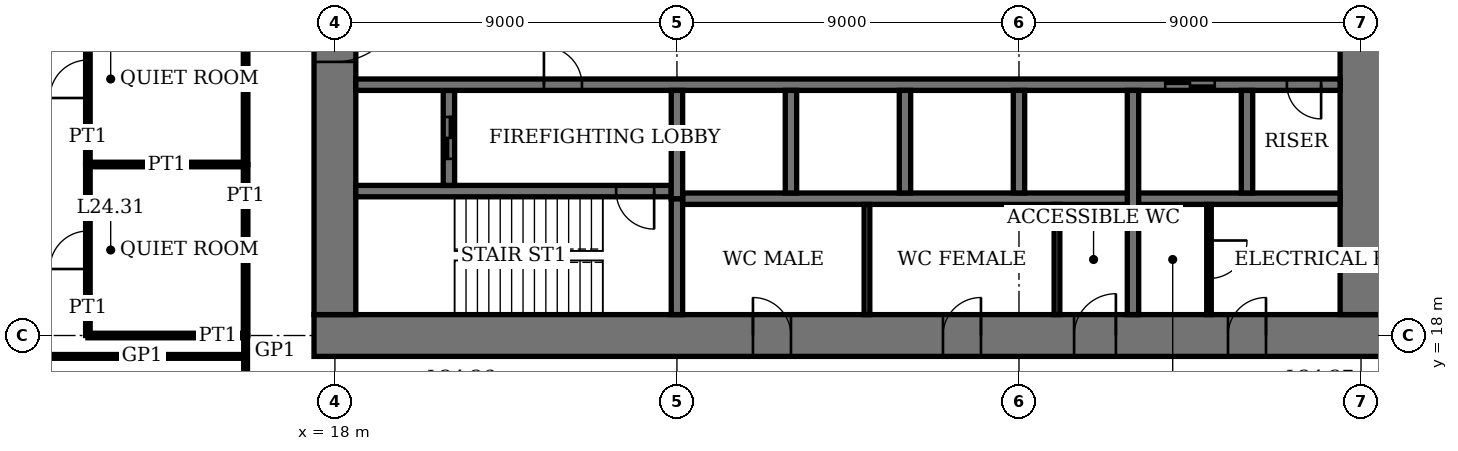
"""IFC4 building model, lengths in metres.
Left out: names, types, materials, properties, quantities, classifications, styles, units other than length and angle.
Written with IfcOpenShell. Run it as: python <this file> out.ifc"""

import sys

from ifc_helpers import new_model, si_unit, direction, frame, frame_2d, origin, place, context, subcontext, project, spatial, rectangle, extrude, element, fill, save


model = new_model("IFC4")
c1 = context("Model", 3, precision=1e-05, world=origin(), true_north=direction((0.0, 1.0)))
c2 = subcontext(c1, "Body", "Model", "MODEL_VIEW")
j1 = project(units=[si_unit("LENGTHUNIT", "METRE"), si_unit("PLANEANGLEUNIT", "RADIAN")], contexts=[c1])
p1 = place(None, origin())
s1 = spatial("IfcSite", under=j1, at=p1, CompositionType="ELEMENT")
p2 = place(p1, origin())
s2 = spatial("IfcBuilding", under=s1, at=p2, CompositionType="ELEMENT")
p3 = place(p2, frame((0.0, 0.0, 101.0)))
s3 = spatial("IfcBuildingStorey", under=s2, at=p3, CompositionType="ELEMENT", Elevation=101.0)
p4 = place(p3, frame((17.45, 18.0, 0.0), z_axis=(0.0, 0.0, 1.0), x_axis=(1.0, 0.0, 0.0)))
e1 = element("IfcWall", 1, at=p4, inside=s3, PredefinedType="SHEAR", context=c2, shape_type="SweptSolid", body=[
    extrude(rectangle(XDim=28.1, YDim=1.1, at=frame_2d((14.05, 0.0))), origin(), (0.0, 0.0, 1.0), 4.0),
])
p5 = place(p4, frame((11.55, 0.0, 0.0)))
e2 = element("IfcOpeningElement", 2, at=p5, cuts=e1, PredefinedType="OPENING", context=c2, shape_type="SweptSolid", body=[
    extrude(rectangle(XDim=1.0, YDim=2.4, at=frame_2d((0.5, 1.2))), frame((0.0, 0.56, 0.0), z_axis=(0.0, -1.0, 0.0), x_axis=(1.0, 0.0, 0.0)), (0.0, 0.0, 1.0), 1.12),
])
p6 = place(p4, frame((16.55, 0.0, 0.0)))
e3 = element("IfcOpeningElement", 3, at=p6, cuts=e1, PredefinedType="OPENING", context=c2, shape_type="SweptSolid", body=[
    extrude(rectangle(XDim=1.0, YDim=2.4, at=frame_2d((0.5, 1.2))), frame((0.0, 0.56, 0.0), z_axis=(0.0, -1.0, 0.0), x_axis=(1.0, 0.0, 0.0)), (0.0, 0.0, 1.0), 1.12),
])
p7 = place(p4, frame((20.0, 0.0, 0.0)))
e4 = element("IfcOpeningElement", 4, at=p7, cuts=e1, PredefinedType="OPENING", context=c2, shape_type="SweptSolid", body=[
    extrude(rectangle(XDim=1.1, YDim=2.4, at=frame_2d((0.55, 1.2))), frame((0.0, 0.56, 0.0), z_axis=(0.0, -1.0, 0.0), x_axis=(1.0, 0.0, 0.0)), (0.0, 0.0, 1.0), 1.12),
])
p8 = place(p4, frame((24.05, 0.0, 0.0)))
e5 = element("IfcOpeningElement", 5, at=p8, cuts=e1, PredefinedType="OPENING", context=c2, shape_type="SweptSolid", body=[
    extrude(rectangle(XDim=1.0, YDim=2.4, at=frame_2d((0.5, 1.2))), frame((0.0, 0.56, 0.0), z_axis=(0.0, -1.0, 0.0), x_axis=(1.0, 0.0, 0.0)), (0.0, 0.0, 1.0), 1.12),
])
p9 = place(p3, frame((18.0, 35.45, 0.0), z_axis=(0.0, 0.0, 1.0), x_axis=(0.0, -1.0, 0.0)))
e6 = element("IfcWall", 6, at=p9, inside=s3, PredefinedType="SHEAR", context=c2, shape_type="SweptSolid", body=[
    extrude(rectangle(XDim=16.9, YDim=1.1, at=frame_2d((8.45, 0.0))), origin(), (0.0, 0.0, 1.0), 4.0),
])
p10 = place(p9, frame((8.45, 0.0, 0.0)))
e7 = element("IfcOpeningElement", 7, at=p10, cuts=e6, PredefinedType="OPENING", context=c2, shape_type="SweptSolid", body=[
    extrude(rectangle(XDim=1.8, YDim=2.4, at=frame_2d((0.9, 1.2))), frame((0.0, 0.56, 0.0), z_axis=(0.0, -1.0, 0.0), x_axis=(1.0, 0.0, 0.0)), (0.0, 0.0, 1.0), 1.12),
])
p11 = place(p3, frame((45.0, 18.55, 0.0), z_axis=(0.0, 0.0, 1.0), x_axis=(0.0, 1.0, 0.0)))
e8 = element("IfcWall", 8, at=p11, inside=s3, PredefinedType="SHEAR", context=c2, shape_type="SweptSolid", body=[
    extrude(rectangle(XDim=16.9, YDim=1.1, at=frame_2d((8.45, 0.0))), origin(), (0.0, 0.0, 1.0), 4.0),
])
p12 = place(p11, frame((8.45, 0.0, 0.0)))
e9 = element("IfcOpeningElement", 9, at=p12, cuts=e8, PredefinedType="OPENING", context=c2, shape_type="SweptSolid", body=[
    extrude(rectangle(XDim=1.8, YDim=2.4, at=frame_2d((0.9, 1.2))), frame((0.0, 0.56, 0.0), z_axis=(0.0, -1.0, 0.0), x_axis=(1.0, 0.0, 0.0)), (0.0, 0.0, 1.0), 1.12),
])
p13 = place(p3, frame((18.55, 21.8, 0.0), z_axis=(0.0, 0.0, 1.0), x_axis=(1.0, 0.0, 0.0)))
e10 = element("IfcWall", 10, at=p13, inside=s3, PredefinedType="SHEAR", context=c2, shape_type="SweptSolid", body=[
    extrude(rectangle(XDim=8.3, YDim=0.3, at=frame_2d((4.15, 0.0))), origin(), (0.0, 0.0, 1.0), 4.0),
])
p14 = place(p13, frame((6.85, 0.0, 0.0)))
e11 = element("IfcOpeningElement", 11, at=p14, cuts=e10, PredefinedType="OPENING", context=c2, shape_type="SweptSolid", body=[
    extrude(rectangle(XDim=1.0, YDim=2.4, at=frame_2d((0.5, 1.2))), frame((0.0, 0.16, 0.0), z_axis=(0.0, -1.0, 0.0), x_axis=(1.0, 0.0, 0.0)), (0.0, 0.0, 1.0), 0.32),
])
p15 = place(p3, frame((27.0, 18.55, 0.0), z_axis=(0.0, 0.0, 1.0), x_axis=(0.0, 1.0, 0.0)))
e12 = element("IfcWall", 12, at=p15, inside=s3, PredefinedType="SHEAR", context=c2, shape_type="SweptSolid", body=[
    extrude(rectangle(XDim=3.05, YDim=0.3, at=frame_2d((1.525, 0.0))), origin(), (0.0, 0.0, 1.0), 4.0),
])
p16 = place(p3, frame((21.0, 21.95, 0.0), z_axis=(0.0, 0.0, 1.0), x_axis=(0.0, 1.0, 0.0)))
e13 = element("IfcWall", 13, at=p16, inside=s3, PredefinedType="SHEAR", context=c2, shape_type="SweptSolid", body=[
    extrude(rectangle(XDim=2.5, YDim=0.3, at=frame_2d((1.25, 0.0))), origin(), (0.0, 0.0, 1.0), 4.0),
])
p17 = place(p16, frame((0.7, 0.0, 0.0)))
e14 = element("IfcOpeningElement", 14, at=p17, cuts=e13, PredefinedType="OPENING", context=c2, shape_type="SweptSolid", body=[
    extrude(rectangle(XDim=1.1, YDim=2.4, at=frame_2d((0.55, 1.2))), frame((0.0, 0.16, 0.0), z_axis=(0.0, -1.0, 0.0), x_axis=(1.0, 0.0, 0.0)), (0.0, 0.0, 1.0), 0.32),
])
p18 = place(p3, frame((18.55, 24.6, 0.0), z_axis=(0.0, 0.0, 1.0), x_axis=(1.0, 0.0, 0.0)))
e15 = element("IfcWall", 15, at=p18, inside=s3, PredefinedType="SHEAR", context=c2, shape_type="SweptSolid", body=[
    extrude(rectangle(XDim=25.9, YDim=0.3, at=frame_2d((12.95, 0.0))), origin(), (0.0, 0.0, 1.0), 4.0),
])
p19 = place(p18, frame((4.95, 0.0, 0.0)))
e16 = element("IfcOpeningElement", 16, at=p19, cuts=e15, PredefinedType="OPENING", context=c2, shape_type="SweptSolid", body=[
    extrude(rectangle(XDim=1.0, YDim=2.4, at=frame_2d((0.5, 1.2))), frame((0.0, 0.16, 0.0), z_axis=(0.0, -1.0, 0.0), x_axis=(1.0, 0.0, 0.0)), (0.0, 0.0, 1.0), 0.32),
])
p20 = place(p18, frame((24.5, 0.0, 0.0)))
e17 = element("IfcOpeningElement", 17, at=p20, cuts=e15, PredefinedType="OPENING", context=c2, shape_type="SweptSolid", body=[
    extrude(rectangle(XDim=0.9, YDim=2.1, at=frame_2d((0.45, 1.05))), frame((0.0, 0.16, 0.0), z_axis=(0.0, -1.0, 0.0), x_axis=(1.0, 0.0, 0.0)), (0.0, 0.0, 1.0), 0.32),
])
p21 = place(p18, frame((21.3, 0.0, 0.0)))
e18 = element("IfcOpeningElement", 18, at=p21, cuts=e15, PredefinedType="OPENING", context=c2, shape_type="SweptSolid", body=[
    extrude(rectangle(XDim=1.3, YDim=2.4, at=frame_2d((0.65, 1.2))), frame((0.0, 0.16, 0.0), z_axis=(0.0, -1.0, 0.0), x_axis=(1.0, 0.0, 0.0)), (0.0, 0.0, 1.0), 0.32),
])
p22 = place(p3, frame((27.15, 21.6, 0.0), z_axis=(0.0, 0.0, 1.0), x_axis=(1.0, 0.0, 0.0)))
e19 = element("IfcWall", 19, at=p22, inside=s3, PredefinedType="SHEAR", context=c2, shape_type="SweptSolid", body=[
    extrude(rectangle(XDim=17.3, YDim=0.3, at=frame_2d((8.65, 0.0))), origin(), (0.0, 0.0, 1.0), 4.0),
])
for number, where, z_axis, x_axis in (
    (20, (30.0, 21.75, 0.0), (0.0, 0.0, 1.0), (0.0, 1.0, 0.0)),
    (21, (33.0, 21.75, 0.0), (0.0, 0.0, 1.0), (0.0, 1.0, 0.0)),
    (22, (36.0, 21.75, 0.0), (0.0, 0.0, 1.0), (0.0, 1.0, 0.0)),
):
    element("IfcWall", number, at=place(p3, frame(where, z_axis=z_axis, x_axis=x_axis)), inside=s3, PredefinedType="SHEAR", context=c2, shape_type="SweptSolid", body=[
        extrude(rectangle(XDim=2.7, YDim=0.3, at=frame_2d((1.35, 0.0))), origin(), (0.0, 0.0, 1.0), 4.0),
    ])
p23 = place(p3, frame((39.0, 18.55, 0.0), z_axis=(0.0, 0.0, 1.0), x_axis=(0.0, 1.0, 0.0)))
e23 = element("IfcWall", 23, at=p23, inside=s3, PredefinedType="SHEAR", context=c2, shape_type="SweptSolid", body=[
    extrude(rectangle(XDim=5.9, YDim=0.3, at=frame_2d((2.95, 0.0))), origin(), (0.0, 0.0, 1.0), 4.0),
])
p24 = place(p3, frame((42.0, 21.75, 0.0), z_axis=(0.0, 0.0, 1.0), x_axis=(0.0, 1.0, 0.0)))
e24 = element("IfcWall", 24, at=p24, inside=s3, PredefinedType="SHEAR", context=c2, shape_type="SweptSolid", body=[
    extrude(rectangle(XDim=2.7, YDim=0.3, at=frame_2d((1.35, 0.0))), origin(), (0.0, 0.0, 1.0), 4.0),
])
p25 = place(p3, frame((27.0, 21.6, 0.0), z_axis=(0.0, 0.0, 1.0), x_axis=(0.0, 1.0, 0.0)))
e25 = element("IfcWall", 25, at=p25, inside=s3, PredefinedType="SHEAR", context=c2, shape_type="SweptSolid", body=[
    extrude(rectangle(XDim=2.85, YDim=0.3, at=frame_2d((1.425, 0.0))), origin(), (0.0, 0.0, 1.0), 4.0),
])
p26 = place(p3, frame((10.0, 17.45, 0.0), z_axis=(0.0, 0.0, 1.0), x_axis=(1.0, 0.0, 0.0)))
e26 = element("IfcWall", 26, at=p26, inside=s3, PredefinedType="PARTITIONING", context=c2, shape_type="SweptSolid", body=[
    extrude(rectangle(XDim=5.65, YDim=0.1, at=frame_2d((2.825, 0.0))), origin(), (0.0, 0.0, 1.0), 3.75),
])
p27 = place(p3, frame((11.5, 18.0, 0.0), z_axis=(0.0, 0.0, 1.0), x_axis=(1.0, 0.0, 0.0)))
e27 = element("IfcWall", 27, at=p27, inside=s3, PredefinedType="PARTITIONING", context=c2, shape_type="SweptSolid", body=[
    extrude(rectangle(XDim=4.15, YDim=0.12, at=frame_2d((2.075, 0.0))), origin(), (0.0, 0.0, 1.0), 3.05),
])
p28 = place(p3, frame((11.5, 22.5, 0.0), z_axis=(0.0, 0.0, 1.0), x_axis=(1.0, 0.0, 0.0)))
e28 = element("IfcWall", 28, at=p28, inside=s3, PredefinedType="PARTITIONING", context=c2, shape_type="SweptSolid", body=[
    extrude(rectangle(XDim=4.15, YDim=0.12, at=frame_2d((2.075, 0.0))), origin(), (0.0, 0.0, 1.0), 3.1),
])
p29 = place(p3, frame((11.5, 18.0, 0.0), z_axis=(0.0, 0.0, 1.0), x_axis=(0.0, 1.0, 0.0)))
e29 = element("IfcWall", 29, at=p29, inside=s3, PredefinedType="PARTITIONING", context=c2, shape_type="SweptSolid", body=[
    extrude(rectangle(XDim=4.5, YDim=0.12, at=frame_2d((2.25, 0.0))), origin(), (0.0, 0.0, 1.0), 3.75),
])
p30 = place(p29, frame((1.75, 0.0, 0.0)))
e30 = element("IfcOpeningElement", 30, at=p30, cuts=e29, PredefinedType="OPENING", context=c2, shape_type="SweptSolid", body=[
    extrude(rectangle(XDim=1.0, YDim=2.4, at=frame_2d((0.5, 1.2))), frame((0.0, 0.07, 0.0), z_axis=(0.0, -1.0, 0.0), x_axis=(1.0, 0.0, 0.0)), (0.0, 0.0, 1.0), 0.14),
])
p31 = place(p3, frame((11.5, 22.5, 0.0), z_axis=(0.0, 0.0, 1.0), x_axis=(0.0, 1.0, 0.0)))
e31 = element("IfcWall", 31, at=p31, inside=s3, PredefinedType="PARTITIONING", context=c2, shape_type="SweptSolid", body=[
    extrude(rectangle(XDim=4.5, YDim=0.12, at=frame_2d((2.25, 0.0))), origin(), (0.0, 0.0, 1.0), 3.75),
])
p32 = place(p31, frame((1.75, 0.0, 0.0)))
e32 = element("IfcOpeningElement", 32, at=p32, cuts=e31, PredefinedType="OPENING", context=c2, shape_type="SweptSolid", body=[
    extrude(rectangle(XDim=1.0, YDim=2.4, at=frame_2d((0.5, 1.2))), frame((0.0, 0.07, 0.0), z_axis=(0.0, -1.0, 0.0), x_axis=(1.0, 0.0, 0.0)), (0.0, 0.0, 1.0), 0.14),
])
for number, where, z_axis, x_axis in (
    (33, (15.65, 18.0, 0.0), (0.0, 0.0, 1.0), (0.0, 1.0, 0.0)),
    (34, (15.65, 22.5, 0.0), (0.0, 0.0, 1.0), (0.0, 1.0, 0.0)),
):
    element("IfcWall", number, at=place(p3, frame(where, z_axis=z_axis, x_axis=x_axis)), inside=s3, PredefinedType="PARTITIONING", context=c2, shape_type="SweptSolid", body=[
        extrude(rectangle(XDim=4.5, YDim=0.12, at=frame_2d((2.25, 0.0))), origin(), (0.0, 0.0, 1.0), 3.75),
    ])
p33 = place(p3, frame((15.65, 15.65, 0.0), z_axis=(0.0, 0.0, 1.0), x_axis=(0.0, 1.0, 0.0)))
e35 = element("IfcWall", 35, at=p33, inside=s3, PredefinedType="PARTITIONING", context=c2, shape_type="SweptSolid", body=[
    extrude(rectangle(XDim=2.35, YDim=0.1, at=frame_2d((1.175, 0.0))), origin(), (0.0, 0.0, 1.0), 3.75),
])
for number, where, z_axis, x_axis in (
    (36, (32.0, 18.55, 0.0), (0.0, 0.0, 1.0), (0.0, 1.0, 0.0)),
    (37, (37.0, 18.55, 0.0), (0.0, 0.0, 1.0), (0.0, 1.0, 0.0)),
):
    element("IfcWall", number, at=place(p3, frame(where, z_axis=z_axis, x_axis=x_axis)), inside=s3, PredefinedType="PARTITIONING", context=c2, shape_type="SweptSolid", body=[
        extrude(rectangle(XDim=2.9, YDim=0.15, at=frame_2d((1.45, 0.0))), origin(), (0.0, 0.0, 1.0), 3.75),
    ])
p34 = place(p3, frame((41.0, 18.55, 0.0), z_axis=(0.0, 0.0, 1.0), x_axis=(0.0, 1.0, 0.0)))
e38 = element("IfcWall", 38, at=p34, inside=s3, PredefinedType="PARTITIONING", context=c2, shape_type="SweptSolid", body=[
    extrude(rectangle(XDim=2.9, YDim=0.12, at=frame_2d((1.45, 0.0))), origin(), (0.0, 0.0, 1.0), 3.75),
])
p35 = place(p34, frame((0.95, 0.0, 0.0)))
e39 = element("IfcOpeningElement", 39, at=p35, cuts=e38, PredefinedType="OPENING", context=c2, shape_type="SweptSolid", body=[
    extrude(rectangle(XDim=1.0, YDim=2.4, at=frame_2d((0.5, 1.2))), frame((0.0, 0.07, 0.0), z_axis=(0.0, -1.0, 0.0), x_axis=(1.0, 0.0, 0.0)), (0.0, 0.0, 1.0), 0.14),
])
p36 = place(p10, origin())
e40 = element("IfcDoor", 40, at=p36, inside=s3, OperationType="DOUBLE_DOOR_DOUBLE_SWING", PredefinedType="DOOR", context=c2, shape_type="SweptSolid", body=[
    extrude(rectangle(XDim=1.8, YDim=2.4, at=frame_2d((0.9, 1.2))), frame((0.0, 0.03, 0.0), z_axis=(0.0, -1.0, 0.0), x_axis=(1.0, 0.0, 0.0)), (0.0, 0.0, 1.0), 0.06),
    extrude(rectangle(XDim=0.04, YDim=2.4, at=frame_2d((0.02, 1.2))), frame((0.0, 0.55, 0.0), z_axis=(0.0, -1.0, 0.0), x_axis=(1.0, 0.0, 0.0)), (0.0, 0.0, 1.0), 1.1),
    extrude(rectangle(XDim=0.04, YDim=2.4, at=frame_2d((1.78, 1.2))), frame((0.0, 0.55, 0.0), z_axis=(0.0, -1.0, 0.0), x_axis=(1.0, 0.0, 0.0)), (0.0, 0.0, 1.0), 1.1),
    extrude(rectangle(XDim=1.8, YDim=0.04, at=frame_2d((0.9, 2.38))), frame((0.0, 0.55, 0.0), z_axis=(0.0, -1.0, 0.0), x_axis=(1.0, 0.0, 0.0)), (0.0, 0.0, 1.0), 1.1),
])
fill(e7, e40)
p37 = place(p5, origin())
e41 = element("IfcDoor", 41, at=p37, inside=s3, OperationType="SINGLE_SWING_RIGHT", PredefinedType="DOOR", context=c2, shape_type="SweptSolid", body=[
    extrude(rectangle(XDim=1.0, YDim=2.4, at=frame_2d((0.5, 1.2))), frame((0.0, 0.025, 0.0), z_axis=(0.0, -1.0, 0.0), x_axis=(1.0, 0.0, 0.0)), (0.0, 0.0, 1.0), 0.05),
    extrude(rectangle(XDim=0.04, YDim=2.4, at=frame_2d((0.02, 1.2))), frame((0.0, 0.4, 0.0), z_axis=(0.0, -1.0, 0.0), x_axis=(1.0, 0.0, 0.0)), (0.0, 0.0, 1.0), 0.8),
    extrude(rectangle(XDim=0.04, YDim=2.4, at=frame_2d((0.98, 1.2))), frame((0.0, 0.4, 0.0), z_axis=(0.0, -1.0, 0.0), x_axis=(1.0, 0.0, 0.0)), (0.0, 0.0, 1.0), 0.8),
    extrude(rectangle(XDim=1.0, YDim=0.04, at=frame_2d((0.5, 2.38))), frame((0.0, 0.4, 0.0), z_axis=(0.0, -1.0, 0.0), x_axis=(1.0, 0.0, 0.0)), (0.0, 0.0, 1.0), 0.8),
])
fill(e2, e41)
p38 = place(p6, origin())
e42 = element("IfcDoor", 42, at=p38, inside=s3, OperationType="SINGLE_SWING_LEFT", PredefinedType="DOOR", context=c2, shape_type="SweptSolid", body=[
    extrude(rectangle(XDim=1.0, YDim=2.4, at=frame_2d((0.5, 1.2))), frame((0.0, 0.025, 0.0), z_axis=(0.0, -1.0, 0.0), x_axis=(1.0, 0.0, 0.0)), (0.0, 0.0, 1.0), 0.05),
    extrude(rectangle(XDim=0.04, YDim=2.4, at=frame_2d((0.02, 1.2))), frame((0.0, 0.4, 0.0), z_axis=(0.0, -1.0, 0.0), x_axis=(1.0, 0.0, 0.0)), (0.0, 0.0, 1.0), 0.8),
    extrude(rectangle(XDim=0.04, YDim=2.4, at=frame_2d((0.98, 1.2))), frame((0.0, 0.4, 0.0), z_axis=(0.0, -1.0, 0.0), x_axis=(1.0, 0.0, 0.0)), (0.0, 0.0, 1.0), 0.8),
    extrude(rectangle(XDim=1.0, YDim=0.04, at=frame_2d((0.5, 2.38))), frame((0.0, 0.4, 0.0), z_axis=(0.0, -1.0, 0.0), x_axis=(1.0, 0.0, 0.0)), (0.0, 0.0, 1.0), 0.8),
])
fill(e3, e42)
p39 = place(p7, origin())
e43 = element("IfcDoor", 43, at=p39, inside=s3, OperationType="SINGLE_SWING_LEFT", PredefinedType="DOOR", context=c2, shape_type="SweptSolid", body=[
    extrude(rectangle(XDim=1.1, YDim=2.4, at=frame_2d((0.55, 1.2))), frame((0.0, 0.025, 0.0), z_axis=(0.0, -1.0, 0.0), x_axis=(1.0, 0.0, 0.0)), (0.0, 0.0, 1.0), 0.05),
    extrude(rectangle(XDim=0.04, YDim=2.4, at=frame_2d((0.02, 1.2))), frame((0.0, 0.44, 0.0), z_axis=(0.0, -1.0, 0.0), x_axis=(1.0, 0.0, 0.0)), (0.0, 0.0, 1.0), 0.88),
    extrude(rectangle(XDim=0.04, YDim=2.4, at=frame_2d((1.08, 1.2))), frame((0.0, 0.44, 0.0), z_axis=(0.0, -1.0, 0.0), x_axis=(1.0, 0.0, 0.0)), (0.0, 0.0, 1.0), 0.88),
    extrude(rectangle(XDim=1.1, YDim=0.04, at=frame_2d((0.55, 2.38))), frame((0.0, 0.44, 0.0), z_axis=(0.0, -1.0, 0.0), x_axis=(1.0, 0.0, 0.0)), (0.0, 0.0, 1.0), 0.88),
])
fill(e4, e43)
p40 = place(p8, origin())
e44 = element("IfcDoor", 44, at=p40, inside=s3, OperationType="SINGLE_SWING_LEFT", PredefinedType="DOOR", context=c2, shape_type="SweptSolid", body=[
    extrude(rectangle(XDim=1.0, YDim=2.4, at=frame_2d((0.5, 1.2))), frame((0.0, 0.025, 0.0), z_axis=(0.0, -1.0, 0.0), x_axis=(1.0, 0.0, 0.0)), (0.0, 0.0, 1.0), 0.05),
    extrude(rectangle(XDim=0.04, YDim=2.4, at=frame_2d((0.02, 1.2))), frame((0.0, 0.4, 0.0), z_axis=(0.0, -1.0, 0.0), x_axis=(1.0, 0.0, 0.0)), (0.0, 0.0, 1.0), 0.8),
    extrude(rectangle(XDim=0.04, YDim=2.4, at=frame_2d((0.98, 1.2))), frame((0.0, 0.4, 0.0), z_axis=(0.0, -1.0, 0.0), x_axis=(1.0, 0.0, 0.0)), (0.0, 0.0, 1.0), 0.8),
    extrude(rectangle(XDim=1.0, YDim=0.04, at=frame_2d((0.5, 2.38))), frame((0.0, 0.4, 0.0), z_axis=(0.0, -1.0, 0.0), x_axis=(1.0, 0.0, 0.0)), (0.0, 0.0, 1.0), 0.8),
])
fill(e5, e44)
p41 = place(p14, origin())
e45 = element("IfcDoor", 45, at=p41, inside=s3, OperationType="SINGLE_SWING_RIGHT", PredefinedType="DOOR", context=c2, shape_type="SweptSolid", body=[
    extrude(rectangle(XDim=1.0, YDim=2.4, at=frame_2d((0.5, 1.2))), frame((0.0, 0.03, 0.0), z_axis=(0.0, -1.0, 0.0), x_axis=(1.0, 0.0, 0.0)), (0.0, 0.0, 1.0), 0.06),
])
fill(e11, e45)
p42 = place(p19, origin())
e46 = element("IfcDoor", 46, at=p42, inside=s3, OperationType="SINGLE_SWING_RIGHT", PredefinedType="DOOR", context=c2, shape_type="SweptSolid", body=[
    extrude(rectangle(XDim=1.0, YDim=2.4, at=frame_2d((0.5, 1.2))), frame((0.0, 0.03, 0.0), z_axis=(0.0, -1.0, 0.0), x_axis=(1.0, 0.0, 0.0)), (0.0, 0.0, 1.0), 0.06),
])
fill(e16, e46)
p43 = place(p20, origin())
e47 = element("IfcDoor", 47, at=p43, inside=s3, OperationType="SINGLE_SWING_RIGHT", PredefinedType="DOOR", context=c2, shape_type="SweptSolid", body=[
    extrude(rectangle(XDim=0.9, YDim=2.1, at=frame_2d((0.45, 1.05))), frame((0.0, 0.03, 0.0), z_axis=(0.0, -1.0, 0.0), x_axis=(1.0, 0.0, 0.0)), (0.0, 0.0, 1.0), 0.06),
])
fill(e17, e47)
p44 = place(p30, origin())
e48 = element("IfcDoor", 48, at=p44, inside=s3, OperationType="SINGLE_SWING_RIGHT", PredefinedType="DOOR", context=c2, shape_type="SweptSolid", body=[
    extrude(rectangle(XDim=1.0, YDim=2.4, at=frame_2d((0.5, 1.2))), frame((0.0, 0.025, 0.0), z_axis=(0.0, -1.0, 0.0), x_axis=(1.0, 0.0, 0.0)), (0.0, 0.0, 1.0), 0.05),
])
fill(e30, e48)
p45 = place(p32, origin())
e49 = element("IfcDoor", 49, at=p45, inside=s3, OperationType="SINGLE_SWING_RIGHT", PredefinedType="DOOR", context=c2, shape_type="SweptSolid", body=[
    extrude(rectangle(XDim=1.0, YDim=2.4, at=frame_2d((0.5, 1.2))), frame((0.0, 0.025, 0.0), z_axis=(0.0, -1.0, 0.0), x_axis=(1.0, 0.0, 0.0)), (0.0, 0.0, 1.0), 0.05),
])
fill(e32, e49)
p46 = place(p35, origin())
e50 = element("IfcDoor", 50, at=p46, inside=s3, OperationType="SINGLE_SWING_RIGHT", PredefinedType="DOOR", context=c2, shape_type="SweptSolid", body=[
    extrude(rectangle(XDim=1.0, YDim=2.4, at=frame_2d((0.5, 1.2))), frame((0.0, 0.03, 0.0), z_axis=(0.0, -1.0, 0.0), x_axis=(1.0, 0.0, 0.0)), (0.0, 0.0, 1.0), 0.06),
])
fill(e39, e50)
p47 = place(p21, origin())
e51 = element("IfcDoor", 51, at=p47, inside=s3, OperationType="DOUBLE_DOOR_SLIDING", PredefinedType="DOOR", context=c2, shape_type="SweptSolid", body=[
    extrude(rectangle(XDim=1.3, YDim=2.4, at=frame_2d((0.65, 1.2))), frame((0.0, 0.02, 0.0), z_axis=(0.0, -1.0, 0.0), x_axis=(1.0, 0.0, 0.0)), (0.0, 0.0, 1.0), 0.04),
])
fill(e18, e51)
p48 = place(p17, origin())
e52 = element("IfcDoor", 52, at=p48, inside=s3, OperationType="DOUBLE_DOOR_SLIDING", PredefinedType="DOOR", context=c2, shape_type="SweptSolid", body=[
    extrude(rectangle(XDim=1.1, YDim=2.4, at=frame_2d((0.55, 1.2))), frame((0.0, 0.03, 0.0), z_axis=(0.0, -1.0, 0.0), x_axis=(1.0, 0.0, 0.0)), (0.0, 0.0, 1.0), 0.06),
])
fill(e14, e52)
save(model, sys.argv[1])
